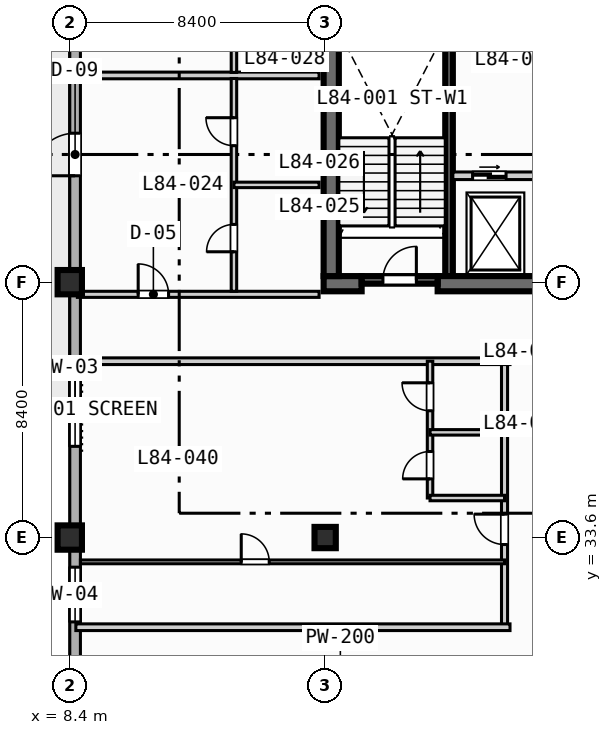
"""IFC4 building model, lengths in metres.
Left out: names, types, materials, properties, quantities, classifications, styles, units other than length and angle.
Written with IfcOpenShell. Run it as: python <this file> out.ifc"""

import sys

from ifc_helpers import new_model, si_unit, direction, frame, frame_2d, origin, origin_2d, place, context, subcontext, project, spatial, rectangle, extrude, element, fill, save


model = new_model("IFC4")
c1 = context("Model", 3, precision=1e-05, world=origin(), true_north=direction((0.0, 1.0)))
c2 = subcontext(c1, "Body", "Model", "MODEL_VIEW")
j1 = project(units=[si_unit("LENGTHUNIT", "METRE"), si_unit("PLANEANGLEUNIT", "RADIAN")], contexts=[c1])
p1 = place(None, origin())
s1 = spatial("IfcSite", under=j1, at=p1, CompositionType="ELEMENT")
p2 = place(p1, origin())
s2 = spatial("IfcBuilding", under=s1, at=p2, CompositionType="ELEMENT")
p3 = place(p2, frame((0.0, 0.0, 339.8)))
s3 = spatial("IfcBuildingStorey", under=s2, at=p3, CompositionType="ELEMENT", Elevation=339.8)
p4 = place(p3, frame((20.875, 42.2, 0.0), z_axis=(0.0, 0.0, 1.0), x_axis=(0.0, 1.0, 0.0)))
e1 = element("IfcWall", 1, at=p4, inside=s3, PredefinedType="SOLIDWALL", context=c2, shape_type="SweptSolid", body=[
    extrude(rectangle(XDim=8.05, YDim=0.25, at=frame_2d((4.025, 0.0))), origin(), (0.0, 0.0, 1.0), 3.67),
])
p5 = place(p3, frame((16.75, 41.95, 0.0), z_axis=(0.0, 0.0, 1.0), x_axis=(1.0, 0.0, 0.0)))
e2 = element("IfcWall", 2, at=p5, inside=s3, PredefinedType="SHEAR", context=c2, shape_type="SweptSolid", body=[
    extrude(rectangle(XDim=1.25, YDim=0.5, at=frame_2d((0.625, 0.0))), origin(), (0.0, 0.0, 1.0), 3.67),
])
p6 = place(p3, frame((20.5, 41.95, 0.0), z_axis=(0.0, 0.0, 1.0), x_axis=(1.0, 0.0, 0.0)))
e3 = element("IfcWall", 3, at=p6, inside=s3, PredefinedType="SHEAR", context=c2, shape_type="SweptSolid", body=[
    extrude(rectangle(XDim=4.95, YDim=0.5, at=frame_2d((2.475, 0.0))), origin(), (0.0, 0.0, 1.0), 3.67),
])
p7 = place(p3, frame((17.0, 42.2, 0.0), z_axis=(0.0, 0.0, 1.0), x_axis=(0.0, 1.0, 0.0)))
e4 = element("IfcWall", 4, at=p7, inside=s3, PredefinedType="SHEAR", context=c2, shape_type="SweptSolid", body=[
    extrude(rectangle(XDim=16.35, YDim=0.5, at=frame_2d((8.175, 0.0))), origin(), (0.0, 0.0, 1.0), 3.67),
])
for number, where, z_axis, x_axis in (
    (5, (8.4, 33.6, 0.0), (0.0, 0.0, 1.0), (1.0, 0.0, 0.0)),
    (6, (8.4, 42.0, 0.0), (0.0, 0.0, 1.0), (1.0, 0.0, 0.0)),
):
    element("IfcColumn", number, at=place(p3, frame(where, z_axis=z_axis, x_axis=x_axis)), inside=s3, PredefinedType="COLUMN", context=c2, shape_type="SweptSolid", body=[
        extrude(rectangle(XDim=0.8, YDim=0.8, at=origin_2d()), origin(), (0.0, 0.0, 1.0), 3.9),
    ])
p8 = place(p3, frame((16.8, 33.6, 0.0), z_axis=(0.0, 0.0, 1.0), x_axis=(1.0, 0.0, 0.0)))
e7 = element("IfcColumn", 7, at=p8, inside=s3, PredefinedType="COLUMN", context=c2, shape_type="SweptSolid", body=[
    extrude(rectangle(XDim=0.7, YDim=0.7, at=origin_2d()), origin(), (0.0, 0.0, 1.0), 3.9),
])
p9 = place(p3, frame((8.575, 11.575, 0.0), z_axis=(0.0, 0.0, 1.0), x_axis=(0.0, 1.0, 0.0)))
e8 = element("IfcWall", 8, at=p9, inside=s3, PredefinedType="STANDARD", context=c2, shape_type="SweptSolid", body=[
    extrude(rectangle(XDim=60.85, YDim=0.35, at=frame_2d((30.425, 0.0))), origin(), (0.0, 0.0, 1.0), 3.67),
])
p10 = place(p9, frame((33.925, 0.0, 0.0)))
e9 = element("IfcOpeningElement", 9, at=p10, cuts=e8, PredefinedType="OPENING", context=c2, shape_type="SweptSolid", body=[
    extrude(rectangle(XDim=1.4, YDim=2.2, at=frame_2d((0.7, 1.1))), frame((0.0, 0.185, 0.0), z_axis=(0.0, -1.0, 0.0), x_axis=(1.0, 0.0, 0.0)), (0.0, 0.0, 1.0), 0.37),
])
p11 = place(p9, frame((25.025, 0.0, 0.85)))
e10 = element("IfcOpeningElement", 10, at=p11, cuts=e8, PredefinedType="OPENING", context=c2, shape_type="SweptSolid", body=[
    extrude(rectangle(XDim=2.4, YDim=1.95, at=frame_2d((1.2, 0.975))), frame((0.0, 0.185, 0.0), z_axis=(0.0, -1.0, 0.0), x_axis=(1.0, 0.0, 0.0)), (0.0, 0.0, 1.0), 0.37),
])
p12 = place(p9, frame((41.825, 0.0, 0.85)))
e11 = element("IfcOpeningElement", 11, at=p12, cuts=e8, PredefinedType="OPENING", context=c2, shape_type="SweptSolid", body=[
    extrude(rectangle(XDim=2.4, YDim=1.95, at=frame_2d((1.2, 0.975))), frame((0.0, 0.185, 0.0), z_axis=(0.0, -1.0, 0.0), x_axis=(1.0, 0.0, 0.0)), (0.0, 0.0, 1.0), 0.37),
])
p13 = place(p9, frame((19.25, 0.0, 0.85)))
e12 = element("IfcOpeningElement", 12, at=p13, cuts=e8, PredefinedType="OPENING", context=c2, shape_type="SweptSolid", body=[
    extrude(rectangle(XDim=1.8, YDim=1.8, at=frame_2d((0.9, 0.9))), frame((0.0, 0.185, 0.0), z_axis=(0.0, -1.0, 0.0), x_axis=(1.0, 0.0, 0.0)), (0.0, 0.0, 1.0), 0.37),
])
p14 = place(p3, frame((18.0, 42.075, 0.0), z_axis=(0.0, 0.0, 1.0), x_axis=(1.0, 0.0, 0.0)))
e13 = element("IfcWall", 13, at=p14, inside=s3, PredefinedType="SOLIDWALL", context=c2, shape_type="SweptSolid", body=[
    extrude(rectangle(XDim=2.5, YDim=0.25, at=frame_2d((1.25, 0.0))), origin(), (0.0, 0.0, 1.0), 3.67),
])
p15 = place(p14, frame((0.7, 0.0, 0.0)))
e14 = element("IfcOpeningElement", 14, at=p15, cuts=e13, PredefinedType="OPENING", context=c2, shape_type="SweptSolid", body=[
    extrude(rectangle(XDim=1.1, YDim=2.15, at=frame_2d((0.55, 1.075))), frame((0.0, 0.135, 0.0), z_axis=(0.0, -1.0, 0.0), x_axis=(1.0, 0.0, 0.0)), (0.0, 0.0, 1.0), 0.27),
])
p16 = place(p3, frame((21.0, 45.5, 0.0), z_axis=(0.0, 0.0, 1.0), x_axis=(1.0, 0.0, 0.0)))
e15 = element("IfcWall", 15, at=p16, inside=s3, PredefinedType="SOLIDWALL", context=c2, shape_type="SweptSolid", body=[
    extrude(rectangle(XDim=4.15, YDim=0.25, at=frame_2d((2.075, 0.0))), origin(), (0.0, 0.0, 1.0), 3.67),
])
p17 = place(p16, frame((0.65, 0.0, 0.0)))
e16 = element("IfcOpeningElement", 16, at=p17, cuts=e15, PredefinedType="OPENING", context=c2, shape_type="SweptSolid", body=[
    extrude(rectangle(XDim=1.1, YDim=2.15, at=frame_2d((0.55, 1.075))), frame((0.0, 0.135, 0.0), z_axis=(0.0, -1.0, 0.0), x_axis=(1.0, 0.0, 0.0)), (0.0, 0.0, 1.0), 0.27),
])
p18 = place(p3, frame((8.65, 41.6, 0.0), z_axis=(0.0, 0.0, 1.0), x_axis=(1.0, 0.0, 0.0)))
e17 = element("IfcWall", 17, at=p18, inside=s3, PredefinedType="PARTITIONING", context=c2, shape_type="SweptSolid", body=[
    extrude(rectangle(XDim=7.95, YDim=0.2, at=frame_2d((3.975, 0.0))), origin(), (0.0, 0.0, 1.0), 3.67),
])
p19 = place(p18, frame((2.0, 0.0, 0.0)))
e18 = element("IfcOpeningElement", 18, at=p19, cuts=e17, PredefinedType="OPENING", context=c2, shape_type="SweptSolid", body=[
    extrude(rectangle(XDim=1.0, YDim=2.15, at=frame_2d((0.5, 1.075))), frame((0.0, 0.11, 0.0), z_axis=(0.0, -1.0, 0.0), x_axis=(1.0, 0.0, 0.0)), (0.0, 0.0, 1.0), 0.22),
])
p20 = place(p3, frame((8.65, 48.8, 0.0), z_axis=(0.0, 0.0, 1.0), x_axis=(1.0, 0.0, 0.0)))
e19 = element("IfcWall", 19, at=p20, inside=s3, PredefinedType="PARTITIONING", context=c2, shape_type="SweptSolid", body=[
    extrude(rectangle(XDim=7.95, YDim=0.22, at=frame_2d((3.975, 0.0))), origin(), (0.0, 0.0, 1.0), 3.67),
])
p21 = place(p3, frame((13.8, 41.7, 0.0), z_axis=(0.0, 0.0, 1.0), x_axis=(0.0, 1.0, 0.0)))
e20 = element("IfcWall", 20, at=p21, inside=s3, PredefinedType="PLUMBINGWALL", context=c2, shape_type="SweptSolid", body=[
    extrude(rectangle(XDim=7.0, YDim=0.18, at=frame_2d((3.5, 0.0))), origin(), (0.0, 0.0, 1.0), 3.67),
])
p22 = place(p21, frame((1.3, 0.0, 0.0)))
e21 = element("IfcOpeningElement", 21, at=p22, cuts=e20, PredefinedType="OPENING", context=c2, shape_type="SweptSolid", body=[
    extrude(rectangle(XDim=0.9, YDim=2.1, at=frame_2d((0.45, 1.05))), frame((0.0, 0.1, 0.0), z_axis=(0.0, -1.0, 0.0), x_axis=(1.0, 0.0, 0.0)), (0.0, 0.0, 1.0), 0.2),
])
p23 = place(p21, frame((4.79, 0.0, 0.0)))
e22 = element("IfcOpeningElement", 22, at=p23, cuts=e20, PredefinedType="OPENING", context=c2, shape_type="SweptSolid", body=[
    extrude(rectangle(XDim=0.92, YDim=2.1, at=frame_2d((0.46, 1.05))), frame((0.0, 0.1, 0.0), z_axis=(0.0, -1.0, 0.0), x_axis=(1.0, 0.0, 0.0)), (0.0, 0.0, 1.0), 0.2),
])
p24 = place(p3, frame((13.8, 45.2, 0.0), z_axis=(0.0, 0.0, 1.0), x_axis=(1.0, 0.0, 0.0)))
e23 = element("IfcWall", 23, at=p24, inside=s3, PredefinedType="PLUMBINGWALL", context=c2, shape_type="SweptSolid", body=[
    extrude(rectangle(XDim=2.8, YDim=0.18, at=frame_2d((1.4, 0.0))), origin(), (0.0, 0.0, 1.0), 3.67),
])
p25 = place(p3, frame((13.8, 48.9, 0.0), z_axis=(0.0, 0.0, 1.0), x_axis=(0.0, 1.0, 0.0)))
e24 = element("IfcWall", 24, at=p25, inside=s3, PredefinedType="PLUMBINGWALL", context=c2, shape_type="SweptSolid", body=[
    extrude(rectangle(XDim=10.0, YDim=0.18, at=frame_2d((5.0, 0.0))), origin(), (0.0, 0.0, 1.0), 3.67),
])
p26 = place(p25, frame((2.05, 0.0, 0.0)))
e25 = element("IfcOpeningElement", 25, at=p26, cuts=e24, PredefinedType="OPENING", context=c2, shape_type="SweptSolid", body=[
    extrude(rectangle(XDim=0.9, YDim=2.1, at=frame_2d((0.45, 1.05))), frame((0.0, 0.1, 0.0), z_axis=(0.0, -1.0, 0.0), x_axis=(1.0, 0.0, 0.0)), (0.0, 0.0, 1.0), 0.2),
])
p27 = place(p25, frame((7.04, 0.0, 0.0)))
e26 = element("IfcOpeningElement", 26, at=p27, cuts=e24, PredefinedType="OPENING", context=c2, shape_type="SweptSolid", body=[
    extrude(rectangle(XDim=0.92, YDim=2.1, at=frame_2d((0.46, 1.05))), frame((0.0, 0.1, 0.0), z_axis=(0.0, -1.0, 0.0), x_axis=(1.0, 0.0, 0.0)), (0.0, 0.0, 1.0), 0.2),
])
p28 = place(p3, frame((22.7, 30.65, 0.0), z_axis=(0.0, 0.0, 1.0), x_axis=(0.0, 1.0, 0.0)))
e27 = element("IfcWall", 27, at=p28, inside=s3, PredefinedType="PARTITIONING", context=c2, shape_type="SweptSolid", body=[
    extrude(rectangle(XDim=8.75, YDim=0.2, at=frame_2d((4.375, 0.0))), origin(), (0.0, 0.0, 1.0), 3.67),
])
p29 = place(p28, frame((2.72, 0.0, 0.0)))
e28 = element("IfcOpeningElement", 28, at=p29, cuts=e27, PredefinedType="OPENING", context=c2, shape_type="SweptSolid", body=[
    extrude(rectangle(XDim=1.0, YDim=2.15, at=frame_2d((0.5, 1.075))), frame((0.0, 0.11, 0.0), z_axis=(0.0, -1.0, 0.0), x_axis=(1.0, 0.0, 0.0)), (0.0, 0.0, 1.0), 0.22),
])
for number, where, z_axis, x_axis in (
    (29, (8.6, 30.65, 0.0), (0.0, 0.0, 1.0), (1.0, 0.0, 0.0)),
    (30, (8.6, 39.4, 0.0), (0.0, 0.0, 1.0), (1.0, 0.0, 0.0)),
):
    element("IfcWall", number, at=place(p3, frame(where, z_axis=z_axis, x_axis=x_axis)), inside=s3, PredefinedType="PARTITIONING", context=c2, shape_type="SweptSolid", body=[
        extrude(rectangle(XDim=14.28, YDim=0.22, at=frame_2d((7.14, 0.0))), origin(), (0.0, 0.0, 1.0), 3.67),
    ])
p30 = place(p3, frame((20.25, 34.9, 0.0), z_axis=(0.0, 0.0, 1.0), x_axis=(0.0, 1.0, 0.0)))
e31 = element("IfcWall", 31, at=p30, inside=s3, PredefinedType="PLUMBINGWALL", context=c2, shape_type="SweptSolid", body=[
    extrude(rectangle(XDim=4.5, YDim=0.18, at=frame_2d((2.25, 0.0))), origin(), (0.0, 0.0, 1.0), 3.67),
])
p31 = place(p30, frame((0.63, 0.0, 0.0)))
e32 = element("IfcOpeningElement", 32, at=p31, cuts=e31, PredefinedType="OPENING", context=c2, shape_type="SweptSolid", body=[
    extrude(rectangle(XDim=0.9, YDim=2.1, at=frame_2d((0.45, 1.05))), frame((0.0, 0.1, 0.0), z_axis=(0.0, -1.0, 0.0), x_axis=(1.0, 0.0, 0.0)), (0.0, 0.0, 1.0), 0.2),
])
p32 = place(p30, frame((2.87, 0.0, 0.0)))
e33 = element("IfcOpeningElement", 33, at=p32, cuts=e31, PredefinedType="OPENING", context=c2, shape_type="SweptSolid", body=[
    extrude(rectangle(XDim=0.92, YDim=2.1, at=frame_2d((0.46, 1.05))), frame((0.0, 0.1, 0.0), z_axis=(0.0, -1.0, 0.0), x_axis=(1.0, 0.0, 0.0)), (0.0, 0.0, 1.0), 0.2),
])
for number, where, z_axis, x_axis in (
    (34, (20.25, 34.9, 0.0), (0.0, 0.0, 1.0), (1.0, 0.0, 0.0)),
    (35, (20.25, 37.06, 0.0), (0.0, 0.0, 1.0), (1.0, 0.0, 0.0)),
):
    element("IfcWall", number, at=place(p3, frame(where, z_axis=z_axis, x_axis=x_axis)), inside=s3, PredefinedType="PLUMBINGWALL", context=c2, shape_type="SweptSolid", body=[
        extrude(rectangle(XDim=2.45, YDim=0.18, at=frame_2d((1.225, 0.0))), origin(), (0.0, 0.0, 1.0), 3.67),
    ])
p33 = place(p3, frame((8.75, 32.8, 0.0), z_axis=(0.0, 0.0, 1.0), x_axis=(1.0, 0.0, 0.0)))
e36 = element("IfcWall", 36, at=p33, inside=s3, PredefinedType="PARTITIONING", context=c2, shape_type="SweptSolid", body=[
    extrude(rectangle(XDim=13.95, YDim=0.125, at=frame_2d((6.975, 0.0))), origin(), (0.0, 0.0, 1.0), 3.67),
])
p34 = place(p33, frame((5.29, 0.0, 0.0)))
e37 = element("IfcOpeningElement", 37, at=p34, cuts=e36, PredefinedType="OPENING", context=c2, shape_type="SweptSolid", body=[
    extrude(rectangle(XDim=0.92, YDim=2.1, at=frame_2d((0.46, 1.05))), frame((0.0, 0.073, 0.0), z_axis=(0.0, -1.0, 0.0), x_axis=(1.0, 0.0, 0.0)), (0.0, 0.0, 1.0), 0.145),
])
p35 = place(p10, origin())
e38 = element("IfcDoor", 38, at=p35, inside=s3, OperationType="SINGLE_SWING_LEFT", PredefinedType="DOOR", context=c2, shape_type="SweptSolid", body=[
    extrude(rectangle(XDim=1.4, YDim=2.2, at=frame_2d((0.7, 1.1))), frame((0.0, 0.025, 0.0), z_axis=(0.0, -1.0, 0.0), x_axis=(1.0, 0.0, 0.0)), (0.0, 0.0, 1.0), 0.05),
])
fill(e9, e38)
p36 = place(p11, origin())
e39 = element("IfcWindow", 39, at=p36, inside=s3, PartitioningType="SINGLE_PANEL", PredefinedType="WINDOW", context=c2, shape_type="SweptSolid", body=[
    extrude(rectangle(XDim=2.4, YDim=1.95, at=frame_2d((1.2, 0.975))), frame((0.0, 0.03, 0.0), z_axis=(0.0, -1.0, 0.0), x_axis=(1.0, 0.0, 0.0)), (0.0, 0.0, 1.0), 0.06),
])
fill(e10, e39)
p37 = place(p13, origin())
e40 = element("IfcWindow", 40, at=p37, inside=s3, PartitioningType="SINGLE_PANEL", PredefinedType="WINDOW", context=c2, shape_type="SweptSolid", body=[
    extrude(rectangle(XDim=1.8, YDim=1.8, at=frame_2d((0.9, 0.9))), frame((0.0, 0.03, 0.0), z_axis=(0.0, -1.0, 0.0), x_axis=(1.0, 0.0, 0.0)), (0.0, 0.0, 1.0), 0.06),
])
fill(e12, e40)
p38 = place(p15, origin())
e41 = element("IfcDoor", 41, at=p38, inside=s3, OperationType="SINGLE_SWING_RIGHT", PredefinedType="DOOR", context=c2, shape_type="SweptSolid", body=[
    extrude(rectangle(XDim=1.1, YDim=2.15, at=frame_2d((0.55, 1.075))), frame((0.0, 0.025, 0.0), z_axis=(0.0, -1.0, 0.0), x_axis=(1.0, 0.0, 0.0)), (0.0, 0.0, 1.0), 0.05),
])
fill(e14, e41)
p39 = place(p17, origin())
e42 = element("IfcDoor", 42, at=p39, inside=s3, OperationType="SLIDING_TO_LEFT", PredefinedType="DOOR", context=c2, shape_type="SweptSolid", body=[
    extrude(rectangle(XDim=1.1, YDim=2.15, at=frame_2d((0.55, 1.075))), frame((0.0, 0.025, 0.0), z_axis=(0.0, -1.0, 0.0), x_axis=(1.0, 0.0, 0.0)), (0.0, 0.0, 1.0), 0.05),
])
fill(e16, e42)
p40 = place(p19, origin())
e43 = element("IfcDoor", 43, at=p40, inside=s3, OperationType="SINGLE_SWING_LEFT", PredefinedType="DOOR", context=c2, shape_type="SweptSolid", body=[
    extrude(rectangle(XDim=1.0, YDim=2.15, at=frame_2d((0.5, 1.075))), frame((0.0, 0.025, 0.0), z_axis=(0.0, -1.0, 0.0), x_axis=(1.0, 0.0, 0.0)), (0.0, 0.0, 1.0), 0.05),
])
fill(e18, e43)
p41 = place(p22, origin())
e44 = element("IfcDoor", 44, at=p41, inside=s3, OperationType="SINGLE_SWING_LEFT", PredefinedType="DOOR", context=c2, shape_type="SweptSolid", body=[
    extrude(rectangle(XDim=0.9, YDim=2.1, at=frame_2d((0.45, 1.05))), frame((0.0, 0.025, 0.0), z_axis=(0.0, -1.0, 0.0), x_axis=(1.0, 0.0, 0.0)), (0.0, 0.0, 1.0), 0.05),
])
fill(e21, e44)
p42 = place(p23, origin())
e45 = element("IfcDoor", 45, at=p42, inside=s3, OperationType="SINGLE_SWING_RIGHT", PredefinedType="DOOR", context=c2, shape_type="SweptSolid", body=[
    extrude(rectangle(XDim=0.92, YDim=2.1, at=frame_2d((0.46, 1.05))), frame((0.0, 0.025, 0.0), z_axis=(0.0, -1.0, 0.0), x_axis=(1.0, 0.0, 0.0)), (0.0, 0.0, 1.0), 0.05),
])
fill(e22, e45)
p43 = place(p29, origin())
e46 = element("IfcDoor", 46, at=p43, inside=s3, OperationType="SINGLE_SWING_RIGHT", PredefinedType="DOOR", context=c2, shape_type="SweptSolid", body=[
    extrude(rectangle(XDim=1.0, YDim=2.15, at=frame_2d((0.5, 1.075))), frame((0.0, 0.025, 0.0), z_axis=(0.0, -1.0, 0.0), x_axis=(1.0, 0.0, 0.0)), (0.0, 0.0, 1.0), 0.05),
])
fill(e28, e46)
p44 = place(p31, origin())
e47 = element("IfcDoor", 47, at=p44, inside=s3, OperationType="SINGLE_SWING_LEFT", PredefinedType="DOOR", context=c2, shape_type="SweptSolid", body=[
    extrude(rectangle(XDim=0.9, YDim=2.1, at=frame_2d((0.45, 1.05))), frame((0.0, 0.025, 0.0), z_axis=(0.0, -1.0, 0.0), x_axis=(1.0, 0.0, 0.0)), (0.0, 0.0, 1.0), 0.05),
])
fill(e32, e47)
p45 = place(p32, origin())
e48 = element("IfcDoor", 48, at=p45, inside=s3, OperationType="SINGLE_SWING_RIGHT", PredefinedType="DOOR", context=c2, shape_type="SweptSolid", body=[
    extrude(rectangle(XDim=0.92, YDim=2.1, at=frame_2d((0.46, 1.05))), frame((0.0, 0.025, 0.0), z_axis=(0.0, -1.0, 0.0), x_axis=(1.0, 0.0, 0.0)), (0.0, 0.0, 1.0), 0.05),
])
fill(e33, e48)
p46 = place(p34, origin())
e49 = element("IfcDoor", 49, at=p46, inside=s3, OperationType="SINGLE_SWING_LEFT", PredefinedType="DOOR", context=c2, shape_type="SweptSolid", body=[
    extrude(rectangle(XDim=0.92, YDim=2.1, at=frame_2d((0.46, 1.05))), frame((0.0, 0.025, 0.0), z_axis=(0.0, -1.0, 0.0), x_axis=(1.0, 0.0, 0.0)), (0.0, 0.0, 1.0), 0.05),
])
fill(e37, e49)
save(model, sys.argv[1])
